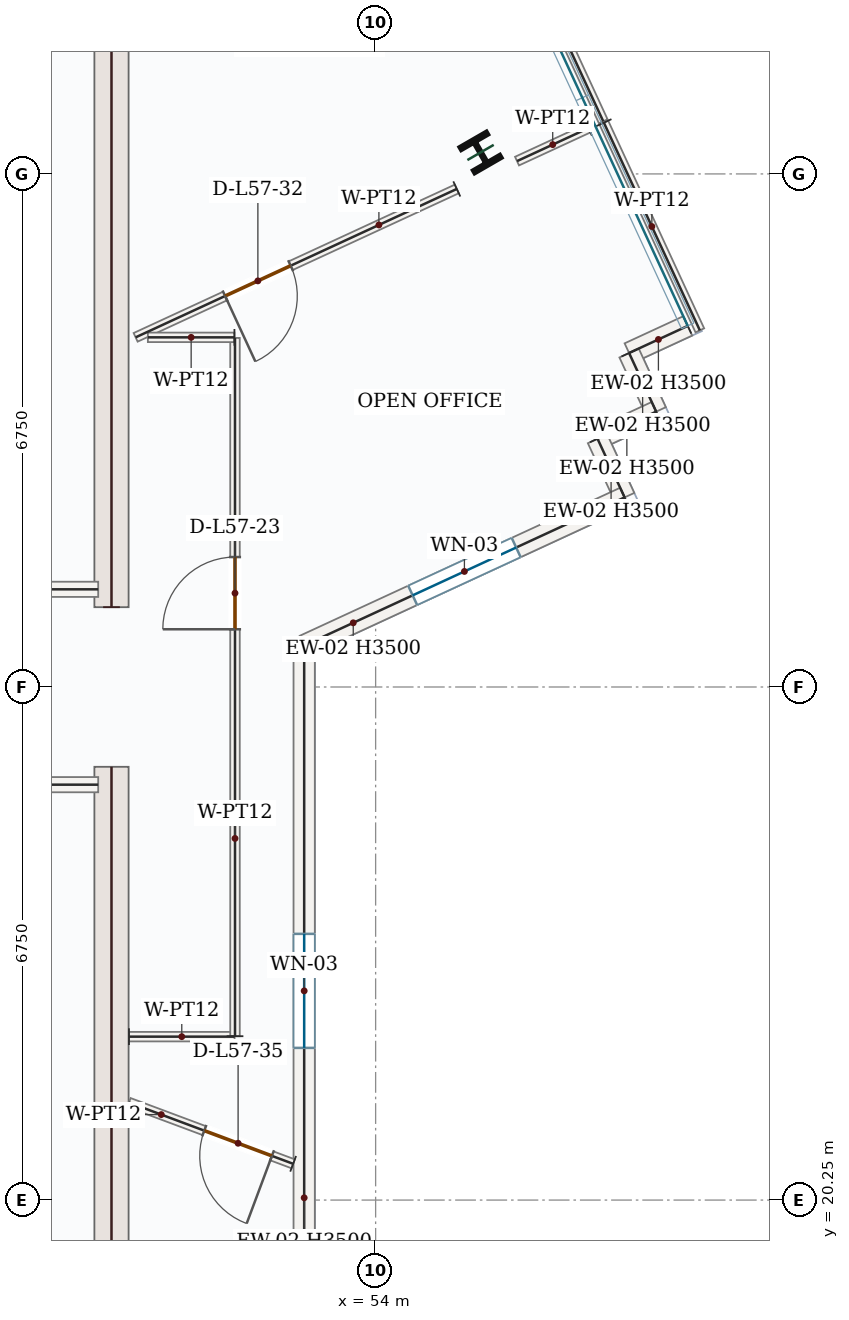
"""IFC4 building model, lengths in metres.
Left out: names, types, materials, properties, quantities, classifications, styles, units other than length and angle.
Written with IfcOpenShell. Run it as: python <this file> out.ifc"""

import sys

from ifc_helpers import new_model, si_unit, direction, frame, frame_2d, origin, origin_2d, place, context, subcontext, project, spatial, rectangle, i_section, extrude, source, transform, mapped, element, fill, save


model = new_model("IFC4")
c1 = context("Model", 3, precision=1e-05, world=origin(), true_north=direction((0.0, 1.0)))
c2 = subcontext(c1, "Body", "Model", "MODEL_VIEW")
j1 = project(units=[si_unit("LENGTHUNIT", "METRE"), si_unit("PLANEANGLEUNIT", "RADIAN")], contexts=[c1])
p1 = place(None, origin())
s1 = spatial("IfcSite", under=j1, at=p1, CompositionType="ELEMENT")
p2 = place(p1, origin())
s2 = spatial("IfcBuilding", under=s1, at=p2, CompositionType="ELEMENT")
p3 = place(p2, frame((0.0, 0.0, 242.85)))
s3 = spatial("IfcBuildingStorey", under=s2, at=p3, CompositionType="ELEMENT", Elevation=242.85)
m1 = source(origin(), c2, "Body", "SweptSolid", [
    extrude(rectangle(XDim=8.55, YDim=0.45, at=frame_2d((4.275, 0.0))), origin(), (0.0, 0.0, 1.0), 3.5),
])
for number, where, z_axis, x_axis in (
    (1, (50.525, 17.4, 0.0), (0.0, 0.0, 1.0), (0.0, 1.0, 0.0)),
    (2, (50.525, 28.05, 0.0), (0.0, 0.0, 1.0), (0.0, 1.0, 0.0)),
):
    element("IfcWall", number, at=place(p3, frame(where, z_axis=z_axis, x_axis=x_axis)), inside=s3, PredefinedType="SHEAR", context=c2, shape_type="MappedRepresentation", body=[
        mapped(m1, transform((0.0, 0.0, 0.0), x_axis=(1.0, 0.0, 0.0), y_axis=(0.0, 1.0, 0.0), z_axis=(0.0, 0.0, 1.0), scale=1.0)),
    ])
m2 = source(origin(), c2, "Body", "SweptSolid", [
    extrude(i_section(OverallWidth=0.399, OverallDepth=0.386, WebThickness=0.021, FlangeThickness=0.033, FilletRadius=0.018, at=origin_2d()), origin(), (0.0, 0.0, 1.0), 3.75),
])
p4 = place(p3, frame((55.38, 34.032, 0.0), z_axis=(0.0, 0.0, 1.0), x_axis=(0.866025403784, 0.5, 0.0)))
e3 = element("IfcColumn", 3, at=p4, inside=s3, PredefinedType="COLUMN", context=c2, shape_type="MappedRepresentation", body=[
    mapped(m2, transform((0.0, 0.0, 0.0), x_axis=(1.0, 0.0, 0.0), y_axis=(0.0, 1.0, 0.0), z_axis=(0.0, 0.0, 1.0), scale=1.0)),
])
m3 = source(origin(), c2, "Body", "SweptSolid", [
    extrude(rectangle(XDim=0.85, YDim=0.28, at=frame_2d((0.425, 0.0))), origin(), (0.0, 0.0, 1.0), 3.5),
])
for number, where, z_axis, x_axis in (
    (4, (58.106, 31.75, 0.0), (0.0, 0.0, 1.0), (-0.908, -0.419, 0.0)),
    (5, (57.334, 31.394, 0.0), (0.0, 0.0, 1.0), (0.419, -0.908, 0.0)),
):
    element("IfcWall", number, at=place(p3, frame(where, z_axis=z_axis, x_axis=x_axis)), inside=s3, PredefinedType="SOLIDWALL", context=c2, shape_type="MappedRepresentation", body=[
        mapped(m3, transform((0.0, 0.0, 0.0), x_axis=(1.0, 0.0, 0.0), y_axis=(0.0, 1.0, 0.0), z_axis=(0.0, 0.0, 1.0), scale=1.0)),
    ])
m4 = source(origin(), c2, "Body", "SweptSolid", [
    extrude(rectangle(XDim=0.85, YDim=0.28, at=frame_2d((0.425, 0.0))), origin(), (0.0, 0.0, 1.0), 3.5),
])
for number, where, z_axis, x_axis in (
    (6, (57.691, 30.622, 0.0), (0.0, 0.0, 1.0), (-0.908, -0.419, 0.0)),
    (7, (56.919, 30.266, 0.0), (0.0, 0.0, 1.0), (0.419, -0.908, 0.0)),
):
    element("IfcWall", number, at=place(p3, frame(where, z_axis=z_axis, x_axis=x_axis)), inside=s3, PredefinedType="SOLIDWALL", context=c2, shape_type="MappedRepresentation", body=[
        mapped(m4, transform((0.0, 0.0, 0.0), x_axis=(1.0, 0.0, 0.0), y_axis=(0.0, 1.0, 0.0), z_axis=(0.0, 0.0, 1.0), scale=1.0)),
    ])
p5 = place(p3, frame((57.276, 29.494, 0.0), z_axis=(0.0, 0.0, 1.0), x_axis=(-0.907756183213, -0.419498166669, 0.0)))
e8 = element("IfcWall", 8, at=p5, inside=s3, PredefinedType="SOLIDWALL", context=c2, shape_type="SweptSolid", body=[
    extrude(rectangle(XDim=4.644, YDim=0.28, at=frame_2d((2.322, 0.0))), origin(), (0.0, 0.0, 1.0), 3.5),
])
p6 = place(p5, frame((1.572, 0.0, 0.85)))
e9 = element("IfcOpeningElement", 9, at=p6, cuts=e8, PredefinedType="OPENING", context=c2, shape_type="SweptSolid", body=[
    extrude(rectangle(XDim=1.5, YDim=1.5, at=frame_2d((0.75, 0.75))), frame((0.0, 0.15, 0.0), z_axis=(0.0, -1.0, 0.0), x_axis=(1.0, 0.0, 0.0)), (0.0, 0.0, 1.0), 0.3),
])
p7 = place(p3, frame((53.06, 27.546, 0.0), z_axis=(0.0, 0.0, 1.0), x_axis=(0.0, -1.0, 0.0)))
e10 = element("IfcWall", 10, at=p7, inside=s3, PredefinedType="SOLIDWALL", context=c2, shape_type="SweptSolid", body=[
    extrude(rectangle(XDim=9.088, YDim=0.28, at=frame_2d((4.544, 0.0))), origin(), (0.0, 0.0, 1.0), 3.5),
])
p8 = place(p7, frame((3.794, 0.0, 0.85)))
e11 = element("IfcOpeningElement", 11, at=p8, cuts=e10, PredefinedType="OPENING", context=c2, shape_type="SweptSolid", body=[
    extrude(rectangle(XDim=1.5, YDim=1.5, at=frame_2d((0.75, 0.75))), frame((0.0, 0.15, 0.0), z_axis=(0.0, -1.0, 0.0), x_axis=(1.0, 0.0, 0.0)), (0.0, 0.0, 1.0), 0.3),
])
m5 = source(origin(), c2, "Body", "SweptSolid", [
    extrude(rectangle(XDim=4.25, YDim=0.2, at=frame_2d((2.125, 0.0))), origin(), (0.0, 0.0, 1.0), 3.5),
])
for number, where, z_axis, x_axis in (
    (12, (46.1, 25.715, 0.0), (0.0, 0.0, 1.0), (1.0, 0.0, 0.0)),
    (13, (46.1, 28.285, 0.0), (0.0, 0.0, 1.0), (1.0, 0.0, 0.0)),
):
    element("IfcWall", number, at=place(p3, frame(where, z_axis=z_axis, x_axis=x_axis)), inside=s3, PredefinedType="SOLIDWALL", context=c2, shape_type="MappedRepresentation", body=[
        mapped(m5, transform((0.0, 0.0, 0.0), x_axis=(1.0, 0.0, 0.0), y_axis=(0.0, 1.0, 0.0), z_axis=(0.0, 0.0, 1.0), scale=1.0)),
    ])
m6 = source(origin(), c2, "Body", "SweptSolid", [
    extrude(rectangle(XDim=4.72, YDim=0.125, at=frame_2d((2.36, 0.0))), origin(), (0.0, 0.0, 1.0), 3.5),
])
p9 = place(p3, frame((55.015, 38.727, 0.0), z_axis=(0.0, 0.0, 1.0), x_axis=(0.419422223592, -0.907791274665, 0.0)))
e14 = element("IfcWall", 14, at=p9, inside=s3, PredefinedType="PARTITIONING", context=c2, shape_type="MappedRepresentation", body=[
    mapped(m6, transform((0.0, 0.0, 0.0), x_axis=(1.0, 0.0, 0.0), y_axis=(0.0, 1.0, 0.0), z_axis=(0.0, 0.0, 1.0), scale=1.0)),
])
m7 = source(origin(), c2, "Body", "SweptSolid", [
    extrude(rectangle(XDim=1.034, YDim=0.125, at=frame_2d((0.517, 0.0))), origin(), (0.0, 0.0, 1.0), 3.5),
])
p10 = place(p3, frame((56.799, 34.352, 0.0), z_axis=(0.0, 0.0, 1.0), x_axis=(-0.907786599617, -0.419432342049, 0.0)))
e15 = element("IfcWall", 15, at=p10, inside=s3, PredefinedType="PARTITIONING", context=c2, shape_type="MappedRepresentation", body=[
    mapped(m7, transform((0.0, 0.0, 0.0), x_axis=(1.0, 0.0, 0.0), y_axis=(0.0, 1.0, 0.0), z_axis=(0.0, 0.0, 1.0), scale=1.0)),
])
p11 = place(p3, frame((55.068, 33.552, 0.0), z_axis=(0.0, 0.0, 1.0), x_axis=(-0.90779658515, -0.419410729465, 0.0)))
e16 = element("IfcWall", 16, at=p11, inside=s3, PredefinedType="PARTITIONING", context=c2, shape_type="SweptSolid", body=[
    extrude(rectangle(XDim=4.655, YDim=0.125, at=frame_2d((2.327, 0.0))), origin(), (0.0, 0.0, 1.0), 3.5),
])
p12 = place(p11, frame((2.408, 0.0, 0.0)))
e17 = element("IfcOpeningElement", 17, at=p12, cuts=e16, PredefinedType="OPENING", context=c2, shape_type="SweptSolid", body=[
    extrude(rectangle(XDim=0.95, YDim=2.15, at=frame_2d((0.475, 1.075))), frame((0.0, 0.073, 0.0), z_axis=(0.0, -1.0, 0.0), x_axis=(1.0, 0.0, 0.0)), (0.0, 0.0, 1.0), 0.145),
])
m8 = source(origin(), c2, "Body", "SweptSolid", [
    extrude(rectangle(XDim=1.389, YDim=0.125, at=frame_2d((0.695, 0.0))), origin(), (0.0, 0.0, 1.0), 3.5),
])
p13 = place(p3, frame((50.755, 22.4, 0.0), z_axis=(0.0, 0.0, 1.0), x_axis=(1.0, 0.0, 0.0)))
e18 = element("IfcWall", 18, at=p13, inside=s3, PredefinedType="PARTITIONING", context=c2, shape_type="MappedRepresentation", body=[
    mapped(m8, transform((0.0, 0.0, 0.0), x_axis=(1.0, 0.0, 0.0), y_axis=(0.0, 1.0, 0.0), z_axis=(0.0, 0.0, 1.0), scale=1.0)),
])
p14 = place(p3, frame((52.15, 22.406, 0.0), z_axis=(0.0, 0.0, 1.0), x_axis=(-2.657666e-05, 0.999999999647, 0.0)))
e19 = element("IfcWall", 19, at=p14, inside=s3, PredefinedType="PARTITIONING", context=c2, shape_type="SweptSolid", body=[
    extrude(rectangle(XDim=9.186, YDim=0.125, at=frame_2d((4.593, 0.0))), origin(), (0.0, 0.0, 1.0), 3.5),
])
p15 = place(p14, frame((5.354, 0.0, 0.0)))
e20 = element("IfcOpeningElement", 20, at=p15, cuts=e19, PredefinedType="OPENING", context=c2, shape_type="SweptSolid", body=[
    extrude(rectangle(XDim=0.95, YDim=2.15, at=frame_2d((0.475, 1.075))), frame((0.0, 0.073, 0.0), z_axis=(0.0, -1.0, 0.0), x_axis=(1.0, 0.0, 0.0)), (0.0, 0.0, 1.0), 0.145),
])
m9 = source(origin(), c2, "Body", "SweptSolid", [
    extrude(rectangle(XDim=1.139, YDim=0.125, at=frame_2d((0.569, 0.0))), origin(), (0.0, 0.0, 1.0), 3.5),
])
p16 = place(p3, frame((52.142, 31.6, 0.0), z_axis=(0.0, 0.0, 1.0), x_axis=(-0.999999908058, 0.000428816427, 0.0)))
e21 = element("IfcWall", 21, at=p16, inside=s3, PredefinedType="PARTITIONING", context=c2, shape_type="MappedRepresentation", body=[
    mapped(m9, transform((0.0, 0.0, 0.0), x_axis=(1.0, 0.0, 0.0), y_axis=(0.0, 1.0, 0.0), z_axis=(0.0, 0.0, 1.0), scale=1.0)),
])
m10 = source(origin(), c2, "Body", "SweptSolid", [
    extrude(rectangle(XDim=3.01, YDim=0.125, at=frame_2d((1.505, 0.0))), origin(), (0.0, 0.0, 1.0), 3.5),
])
p17 = place(p3, frame((57.003, 34.424, 0.0), z_axis=(0.0, 0.0, 1.0), x_axis=(0.419490178077, -0.90775987491, 0.0)))
e22 = element("IfcWall", 22, at=p17, inside=s3, PredefinedType="PARTITIONING", context=c2, shape_type="MappedRepresentation", body=[
    mapped(m10, transform((0.0, 0.0, 0.0), x_axis=(1.0, 0.0, 0.0), y_axis=(0.0, 1.0, 0.0), z_axis=(0.0, 0.0, 1.0), scale=1.0)),
])
p18 = place(p3, frame((52.915, 20.727, 0.0), z_axis=(0.0, 0.0, 1.0), x_axis=(-0.936884992217, 0.349637685839, 0.0)))
e23 = element("IfcWall", 23, at=p18, inside=s3, PredefinedType="PARTITIONING", context=c2, shape_type="SweptSolid", body=[
    extrude(rectangle(XDim=2.306, YDim=0.125, at=frame_2d((1.153, 0.0))), origin(), (0.0, 0.0, 1.0), 3.5),
])
p19 = place(p18, frame((0.298, 0.0, 0.0)))
e24 = element("IfcOpeningElement", 24, at=p19, cuts=e23, PredefinedType="OPENING", context=c2, shape_type="SweptSolid", body=[
    extrude(rectangle(XDim=0.95, YDim=2.15, at=frame_2d((0.475, 1.075))), frame((0.0, 0.073, 0.0), z_axis=(0.0, -1.0, 0.0), x_axis=(1.0, 0.0, 0.0)), (0.0, 0.0, 1.0), 0.145),
])
m11 = source(origin(), c2, "Body", "SweptSolid", [
    extrude(rectangle(XDim=1.5, YDim=1.5, at=frame_2d((0.75, 0.75))), frame((0.0, 0.03, 0.0), z_axis=(0.0, -1.0, 0.0), x_axis=(1.0, 0.0, 0.0)), (0.0, 0.0, 1.0), 0.06),
])
p20 = place(p6, origin())
e25 = element("IfcWindow", 25, at=p20, inside=s3, PartitioningType="SINGLE_PANEL", PredefinedType="WINDOW", context=c2, shape_type="MappedRepresentation", body=[
    mapped(m11, transform((0.0, 0.0, 0.0), x_axis=(1.0, 0.0, 0.0), y_axis=(0.0, 1.0, 0.0), z_axis=(0.0, 0.0, 1.0), scale=1.0)),
])
fill(e9, e25)
p21 = place(p8, origin())
e26 = element("IfcWindow", 26, at=p21, inside=s3, PartitioningType="SINGLE_PANEL", PredefinedType="WINDOW", context=c2, shape_type="MappedRepresentation", body=[
    mapped(m11, transform((0.0, 0.0, 0.0), x_axis=(1.0, 0.0, 0.0), y_axis=(0.0, 1.0, 0.0), z_axis=(0.0, 0.0, 1.0), scale=1.0)),
])
fill(e11, e26)
m12 = source(origin(), c2, "Body", "SweptSolid", [
    extrude(rectangle(XDim=0.95, YDim=2.15, at=frame_2d((0.475, 1.075))), frame((0.0, 0.025, 0.0), z_axis=(0.0, -1.0, 0.0), x_axis=(1.0, 0.0, 0.0)), (0.0, 0.0, 1.0), 0.05),
])
p22 = place(p15, origin())
e27 = element("IfcDoor", 27, at=p22, inside=s3, OperationType="SINGLE_SWING_LEFT", PredefinedType="DOOR", context=c2, shape_type="MappedRepresentation", body=[
    mapped(m12, transform((0.0, 0.0, 0.0), x_axis=(1.0, 0.0, 0.0), y_axis=(0.0, 1.0, 0.0), z_axis=(0.0, 0.0, 1.0), scale=1.0)),
])
fill(e20, e27)
p23 = place(p12, origin())
e28 = element("IfcDoor", 28, at=p23, inside=s3, OperationType="SINGLE_SWING_RIGHT", PredefinedType="DOOR", context=c2, shape_type="MappedRepresentation", body=[
    mapped(m12, transform((0.0, 0.0, 0.0), x_axis=(1.0, 0.0, 0.0), y_axis=(0.0, 1.0, 0.0), z_axis=(0.0, 0.0, 1.0), scale=1.0)),
])
fill(e17, e28)
p24 = place(p19, origin())
e29 = element("IfcDoor", 29, at=p24, inside=s3, OperationType="SINGLE_SWING_LEFT", PredefinedType="DOOR", context=c2, shape_type="MappedRepresentation", body=[
    mapped(m12, transform((0.0, 0.0, 0.0), x_axis=(1.0, 0.0, 0.0), y_axis=(0.0, 1.0, 0.0), z_axis=(0.0, 0.0, 1.0), scale=1.0)),
])
fill(e24, e29)
save(model, sys.argv[1])
